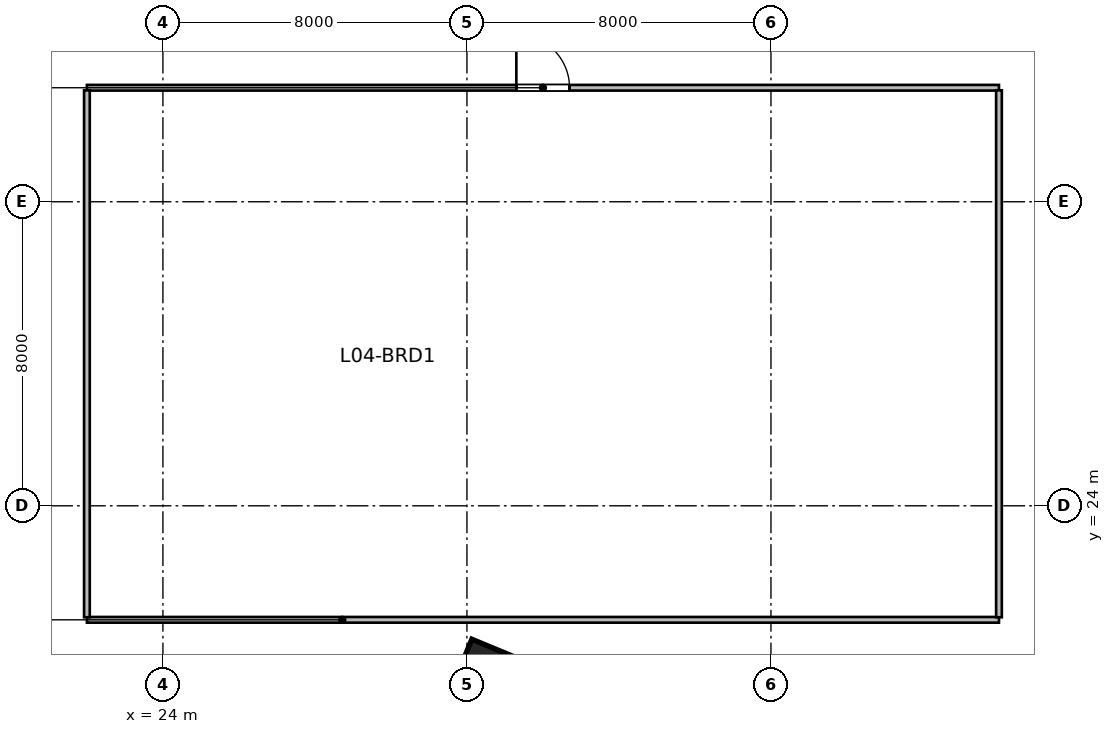
"""IFC4 building model, lengths in metres.
Left out: names, types, materials, properties, quantities, classifications, styles, units other than length and angle.
Written with IfcOpenShell. Run it as: python <this file> out.ifc"""

import sys

from ifc_helpers import new_model, si_unit, direction, frame, frame_2d, origin, origin_2d, place, context, subcontext, project, spatial, rectangle, extrude, source, transform, mapped, element, fill, save


model = new_model("IFC4")
c1 = context("Model", 3, precision=1e-05, world=origin(), true_north=direction((0.0, 1.0)))
c2 = subcontext(c1, "Body", "Model", "MODEL_VIEW")
j1 = project(units=[si_unit("LENGTHUNIT", "METRE"), si_unit("PLANEANGLEUNIT", "RADIAN")], contexts=[c1])
p1 = place(None, origin())
s1 = spatial("IfcSite", under=j1, at=p1, CompositionType="ELEMENT")
p2 = place(p1, origin())
s2 = spatial("IfcBuilding", under=s1, at=p2, CompositionType="ELEMENT")
p3 = place(p2, frame((0.0, 0.0, 24.0)))
s3 = spatial("IfcBuildingStorey", under=s2, at=p3, CompositionType="ELEMENT", Elevation=24.0)
m1 = source(origin(), c2, "Body", "SweptSolid", [
    extrude(rectangle(XDim=1.8, YDim=1.8, at=origin_2d()), origin(), (0.0, 0.0, 1.0), 6.0),
])
p4 = place(p3, frame((32.616, 19.312, 0.0), z_axis=(0.0, 0.0, 1.0), x_axis=(-0.382683432365, -0.923879532511, 0.0)))
e1 = element("IfcColumn", 1, at=p4, inside=s3, PredefinedType="COLUMN", context=c2, shape_type="MappedRepresentation", body=[
    mapped(m1, transform((0.0, 0.0, 0.0), scale=1.0)),
])
m2 = source(origin(), c2, "Body", "SweptSolid", [
    extrude(rectangle(XDim=24.0, YDim=0.15, at=frame_2d((12.0, 0.0))), origin(), (0.0, 0.0, 1.0), 4.611),
])
p5 = place(p3, frame((22.0, 21.0, 0.0), z_axis=(0.0, 0.0, 1.0), x_axis=(1.0, 0.0, 0.0)))
e2 = element("IfcWall", 2, at=p5, inside=s3, PredefinedType="PARTITIONING", context=c2, shape_type="MappedRepresentation", body=[
    mapped(m2, transform((0.0, 0.0, 0.0), scale=1.0)),
])
m3 = source(origin(), c2, "Body", "SweptSolid", [
    extrude(rectangle(XDim=24.0, YDim=0.15, at=frame_2d((12.0, 0.0))), origin(), (0.0, 0.0, 1.0), 5.55),
])
p6 = place(p3, frame((22.0, 35.0, 0.0), z_axis=(0.0, 0.0, 1.0), x_axis=(1.0, 0.0, 0.0)))
e3 = element("IfcWall", 3, at=p6, inside=s3, PredefinedType="PARTITIONING", context=c2, shape_type="MappedRepresentation", body=[
    mapped(m3, transform((0.0, 0.0, 0.0), scale=1.0)),
])
p7 = place(p6, frame((11.3, 0.0, 0.0)))
e4 = element("IfcOpeningElement", 4, at=p7, cuts=e3, PredefinedType="OPENING", context=c2, shape_type="SweptSolid", body=[
    extrude(rectangle(XDim=1.4, YDim=2.15, at=frame_2d((0.7, 1.075))), frame((0.0, 0.085, 0.0), z_axis=(0.0, -1.0, 0.0), x_axis=(1.0, 0.0, 0.0)), (0.0, 0.0, 1.0), 0.17),
])
m4 = source(origin(), c2, "Body", "SweptSolid", [
    extrude(rectangle(XDim=13.865, YDim=0.15, at=frame_2d((6.933, 0.0))), origin(), (0.0, 0.0, 1.0), 2.66),
])
p8 = place(p3, frame((22.0, 21.067, 0.0), z_axis=(0.0, 0.0, 1.0), x_axis=(0.0, 1.0, 0.0)))
e5 = element("IfcWall", 5, at=p8, inside=s3, PredefinedType="PARTITIONING", context=c2, shape_type="MappedRepresentation", body=[
    mapped(m4, transform((0.0, 0.0, 0.0), scale=1.0)),
])
m5 = source(origin(), c2, "Body", "SweptSolid", [
    extrude(rectangle(XDim=13.865, YDim=0.15, at=frame_2d((6.933, 0.0))), origin(), (0.0, 0.0, 1.0), 5.55),
])
p9 = place(p3, frame((46.0, 21.067, 0.0), z_axis=(0.0, 0.0, 1.0), x_axis=(0.0, 1.0, 0.0)))
e6 = element("IfcWall", 6, at=p9, inside=s3, PredefinedType="PARTITIONING", context=c2, shape_type="MappedRepresentation", body=[
    mapped(m5, transform((0.0, 0.0, 0.0), scale=1.0)),
])
m6 = source(origin(), c2, "Body", "SweptSolid", [
    extrude(rectangle(XDim=1.4, YDim=2.15, at=frame_2d((0.7, 1.075))), frame((0.0, 0.025, 0.0), z_axis=(0.0, -1.0, 0.0), x_axis=(1.0, 0.0, 0.0)), (0.0, 0.0, 1.0), 0.05),
])
p10 = place(p7, origin())
e7 = element("IfcDoor", 7, at=p10, inside=s3, OperationType="SINGLE_SWING_LEFT", PredefinedType="DOOR", context=c2, shape_type="MappedRepresentation", body=[
    mapped(m6, transform((0.0, 0.0, 0.0), scale=1.0)),
])
fill(e4, e7)
save(model, sys.argv[1])
